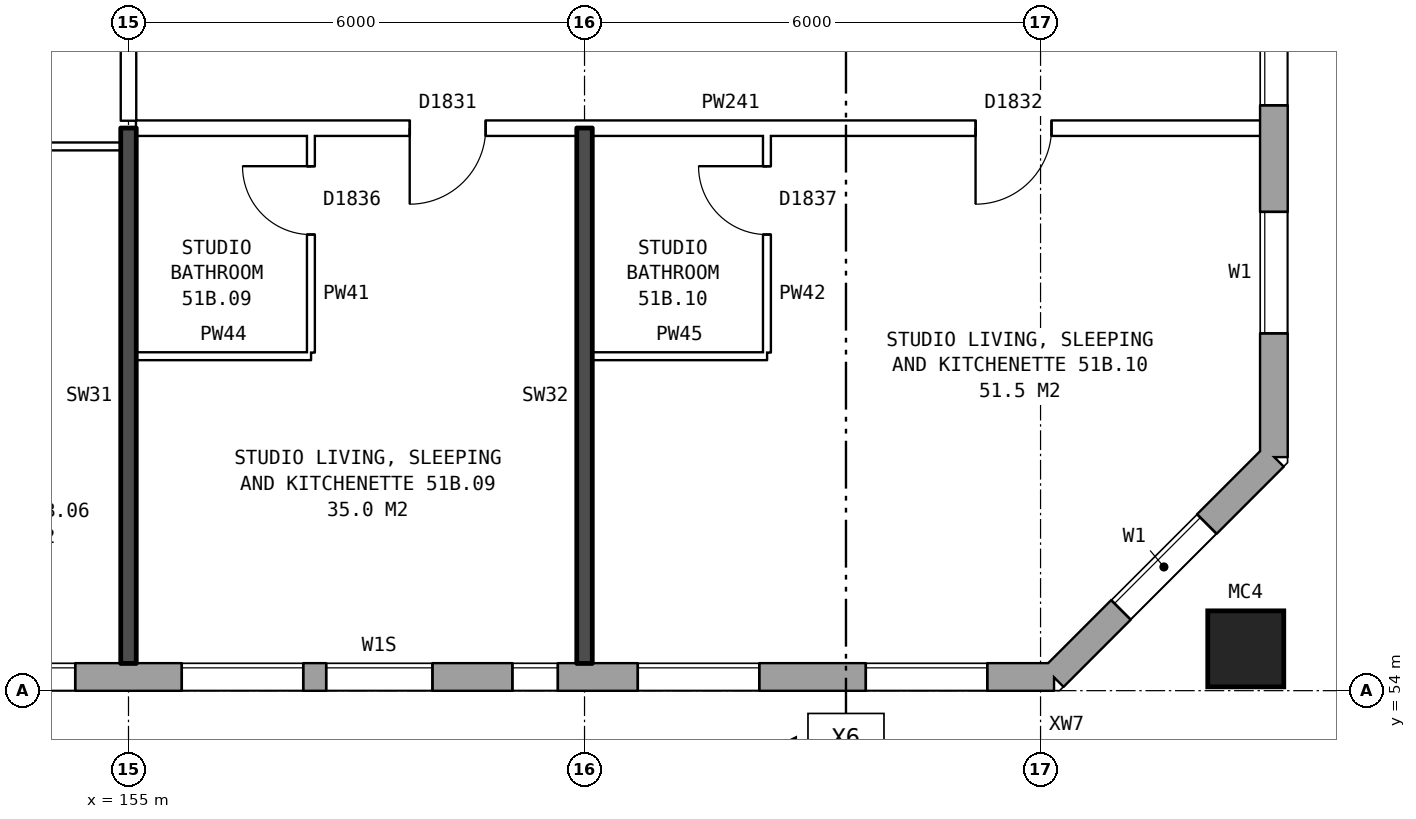
"""IFC4 building model, lengths in metres.
Left out: names, types, materials, properties, quantities, classifications, styles, units other than length and angle.
Written with IfcOpenShell. Run it as: python <this file> out.ifc"""

import sys

from ifc_helpers import new_model, si_unit, direction, frame, frame_2d, origin, origin_2d, place, context, subcontext, project, spatial, rectangle, hollow_rectangle, extrude, element, fill, save


model = new_model("IFC4")
c1 = context("Model", 3, precision=1e-05, world=origin(), true_north=direction((0.0, 1.0)))
c2 = subcontext(c1, "Body", "Model", "MODEL_VIEW")
j1 = project(units=[si_unit("LENGTHUNIT", "METRE"), si_unit("PLANEANGLEUNIT", "RADIAN")], contexts=[c1])
p1 = place(None, origin())
s1 = spatial("IfcSite", under=j1, at=p1, CompositionType="ELEMENT")
p2 = place(p1, origin())
s2 = spatial("IfcBuilding", under=s1, at=p2, CompositionType="ELEMENT")
p3 = place(p2, frame((0.0, 0.0, 182.0)))
s3 = spatial("IfcBuildingStorey", under=s2, at=p3, CompositionType="ELEMENT", Elevation=182.0)
p4 = place(p3, frame((169.7, 54.55, 0.0), z_axis=(0.0, 0.0, 1.0), x_axis=(1.0, 0.0, 0.0)))
e1 = element("IfcColumn", 1, at=p4, inside=s3, PredefinedType="COLUMN", context=c2, shape_type="SweptSolid", body=[
    extrude(hollow_rectangle(XDim=1.0, YDim=1.0, WallThickness=0.055, at=origin_2d()), origin(), (0.0, 0.0, 1.0), 3.1),
])
p5 = place(p3, frame((134.075, 54.18, 0.0), z_axis=(0.0, 0.0, 1.0), x_axis=(1.0, 0.0, 0.0)))
e2 = element("IfcWall", 2, at=p5, inside=s3, PredefinedType="STANDARD", context=c2, shape_type="SweptSolid", body=[
    extrude(rectangle(XDim=33.101, YDim=0.36, at=frame_2d((16.55, 0.0))), origin(), (0.0, 0.0, 1.0), 2.85),
])
p6 = place(p5, frame((0.625, 0.0, 0.8)))
e3 = element("IfcOpeningElement", 3, at=p6, cuts=e2, PredefinedType="OPENING", context=c2, shape_type="SweptSolid", body=[
    extrude(rectangle(XDim=1.6, YDim=1.8, at=frame_2d((0.8, 0.9))), frame((0.0, 0.19, 0.0), z_axis=(0.0, -1.0, 0.0), x_axis=(1.0, 0.0, 0.0)), (0.0, 0.0, 1.0), 0.38),
])
p7 = place(p5, frame((3.625, 0.0, 0.8)))
e4 = element("IfcOpeningElement", 4, at=p7, cuts=e2, PredefinedType="OPENING", context=c2, shape_type="SweptSolid", body=[
    extrude(rectangle(XDim=1.6, YDim=1.8, at=frame_2d((0.8, 0.9))), frame((0.0, 0.19, 0.0), z_axis=(0.0, -1.0, 0.0), x_axis=(1.0, 0.0, 0.0)), (0.0, 0.0, 1.0), 0.38),
])
p8 = place(p5, frame((5.525, 0.0, 0.8)))
e5 = element("IfcOpeningElement", 5, at=p8, cuts=e2, PredefinedType="OPENING", context=c2, shape_type="SweptSolid", body=[
    extrude(rectangle(XDim=0.6, YDim=1.8, at=frame_2d((0.3, 0.9))), frame((0.0, 0.19, 0.0), z_axis=(0.0, -1.0, 0.0), x_axis=(1.0, 0.0, 0.0)), (0.0, 0.0, 1.0), 0.38),
])
p9 = place(p5, frame((9.625, 0.0, 0.8)))
e6 = element("IfcOpeningElement", 6, at=p9, cuts=e2, PredefinedType="OPENING", context=c2, shape_type="SweptSolid", body=[
    extrude(rectangle(XDim=1.6, YDim=1.8, at=frame_2d((0.8, 0.9))), frame((0.0, 0.19, 0.0), z_axis=(0.0, -1.0, 0.0), x_axis=(1.0, 0.0, 0.0)), (0.0, 0.0, 1.0), 0.38),
])
p10 = place(p5, frame((12.625, 0.0, 0.8)))
e7 = element("IfcOpeningElement", 7, at=p10, cuts=e2, PredefinedType="OPENING", context=c2, shape_type="SweptSolid", body=[
    extrude(rectangle(XDim=1.6, YDim=1.8, at=frame_2d((0.8, 0.9))), frame((0.0, 0.19, 0.0), z_axis=(0.0, -1.0, 0.0), x_axis=(1.0, 0.0, 0.0)), (0.0, 0.0, 1.0), 0.38),
])
p11 = place(p5, frame((15.625, 0.0, 0.8)))
e8 = element("IfcOpeningElement", 8, at=p11, cuts=e2, PredefinedType="OPENING", context=c2, shape_type="SweptSolid", body=[
    extrude(rectangle(XDim=1.6, YDim=1.8, at=frame_2d((0.8, 0.9))), frame((0.0, 0.19, 0.0), z_axis=(0.0, -1.0, 0.0), x_axis=(1.0, 0.0, 0.0)), (0.0, 0.0, 1.0), 0.38),
])
p12 = place(p5, frame((18.625, 0.0, 0.8)))
e9 = element("IfcOpeningElement", 9, at=p12, cuts=e2, PredefinedType="OPENING", context=c2, shape_type="SweptSolid", body=[
    extrude(rectangle(XDim=1.6, YDim=1.8, at=frame_2d((0.8, 0.9))), frame((0.0, 0.19, 0.0), z_axis=(0.0, -1.0, 0.0), x_axis=(1.0, 0.0, 0.0)), (0.0, 0.0, 1.0), 0.38),
])
p13 = place(p5, frame((21.625, 0.0, 0.8)))
e10 = element("IfcOpeningElement", 10, at=p13, cuts=e2, PredefinedType="OPENING", context=c2, shape_type="SweptSolid", body=[
    extrude(rectangle(XDim=1.6, YDim=1.8, at=frame_2d((0.8, 0.9))), frame((0.0, 0.19, 0.0), z_axis=(0.0, -1.0, 0.0), x_axis=(1.0, 0.0, 0.0)), (0.0, 0.0, 1.0), 0.38),
])
p14 = place(p5, frame((23.525, 0.0, 0.8)))
e11 = element("IfcOpeningElement", 11, at=p14, cuts=e2, PredefinedType="OPENING", context=c2, shape_type="SweptSolid", body=[
    extrude(rectangle(XDim=1.4, YDim=0.9, at=frame_2d((0.7, 0.45))), frame((0.0, 0.19, 0.0), z_axis=(0.0, -1.0, 0.0), x_axis=(1.0, 0.0, 0.0)), (0.0, 0.0, 1.0), 0.38),
])
p15 = place(p5, frame((27.625, 0.0, 0.8)))
e12 = element("IfcOpeningElement", 12, at=p15, cuts=e2, PredefinedType="OPENING", context=c2, shape_type="SweptSolid", body=[
    extrude(rectangle(XDim=1.6, YDim=1.8, at=frame_2d((0.8, 0.9))), frame((0.0, 0.19, 0.0), z_axis=(0.0, -1.0, 0.0), x_axis=(1.0, 0.0, 0.0)), (0.0, 0.0, 1.0), 0.38),
])
p16 = place(p5, frame((30.625, 0.0, 0.8)))
e13 = element("IfcOpeningElement", 13, at=p16, cuts=e2, PredefinedType="OPENING", context=c2, shape_type="SweptSolid", body=[
    extrude(rectangle(XDim=1.6, YDim=1.8, at=frame_2d((0.8, 0.9))), frame((0.0, 0.19, 0.0), z_axis=(0.0, -1.0, 0.0), x_axis=(1.0, 0.0, 0.0)), (0.0, 0.0, 1.0), 0.38),
])
p17 = place(p5, frame((6.425, 0.0, 1.6)))
e14 = element("IfcOpeningElement", 14, at=p17, cuts=e2, PredefinedType="OPENING", context=c2, shape_type="SweptSolid", body=[
    extrude(rectangle(XDim=0.6, YDim=0.9, at=frame_2d((0.3, 0.45))), frame((0.0, 0.19, 0.0), z_axis=(0.0, -1.0, 0.0), x_axis=(1.0, 0.0, 0.0)), (0.0, 0.0, 1.0), 0.38),
])
p18 = place(p5, frame((25.975, 0.0, 1.7)))
e15 = element("IfcOpeningElement", 15, at=p18, cuts=e2, PredefinedType="OPENING", context=c2, shape_type="SweptSolid", body=[
    extrude(rectangle(XDim=0.6, YDim=0.9, at=frame_2d((0.3, 0.45))), frame((0.0, 0.19, 0.0), z_axis=(0.0, -1.0, 0.0), x_axis=(1.0, 0.0, 0.0)), (0.0, 0.0, 1.0), 0.38),
])
p19 = place(p3, frame((167.175, 54.18, 0.0), z_axis=(0.0, 0.0, 1.0), x_axis=(0.707106781187, 0.707106781187, 0.0)))
e16 = element("IfcWall", 16, at=p19, inside=s3, PredefinedType="STANDARD", context=c2, shape_type="SweptSolid", body=[
    extrude(rectangle(XDim=4.094, YDim=0.36, at=frame_2d((2.047, 0.0))), origin(), (0.0, 0.0, 1.0), 2.85),
])
p20 = place(p19, frame((1.247, 0.0, 0.8)))
e17 = element("IfcOpeningElement", 17, at=p20, cuts=e16, PredefinedType="OPENING", context=c2, shape_type="SweptSolid", body=[
    extrude(rectangle(XDim=1.6, YDim=1.8, at=frame_2d((0.8, 0.9))), frame((0.0, 0.19, 0.0), z_axis=(0.0, -1.0, 0.0), x_axis=(1.0, 0.0, 0.0)), (0.0, 0.0, 1.0), 0.38),
])
p21 = place(p3, frame((170.07, 57.075, 0.0), z_axis=(0.0, 0.0, 1.0), x_axis=(0.0, 1.0, 0.0)))
e18 = element("IfcWall", 18, at=p21, inside=s3, PredefinedType="STANDARD", context=c2, shape_type="SweptSolid", body=[
    extrude(rectangle(XDim=25.851, YDim=0.36, at=frame_2d((12.925, 0.0))), origin(), (0.0, 0.0, 1.0), 2.85),
])
p22 = place(p21, frame((1.625, 0.0, 0.8)))
e19 = element("IfcOpeningElement", 19, at=p22, cuts=e18, PredefinedType="OPENING", context=c2, shape_type="SweptSolid", body=[
    extrude(rectangle(XDim=1.6, YDim=1.8, at=frame_2d((0.8, 0.9))), frame((0.0, 0.19, 0.0), z_axis=(0.0, -1.0, 0.0), x_axis=(1.0, 0.0, 0.0)), (0.0, 0.0, 1.0), 0.38),
])
p23 = place(p21, frame((4.625, 0.0, 0.8)))
e20 = element("IfcOpeningElement", 20, at=p23, cuts=e18, PredefinedType="OPENING", context=c2, shape_type="SweptSolid", body=[
    extrude(rectangle(XDim=1.6, YDim=1.8, at=frame_2d((0.8, 0.9))), frame((0.0, 0.19, 0.0), z_axis=(0.0, -1.0, 0.0), x_axis=(1.0, 0.0, 0.0)), (0.0, 0.0, 1.0), 0.38),
])
p24 = place(p21, frame((7.625, 0.0, 0.8)))
e21 = element("IfcOpeningElement", 21, at=p24, cuts=e18, PredefinedType="OPENING", context=c2, shape_type="SweptSolid", body=[
    extrude(rectangle(XDim=1.6, YDim=1.8, at=frame_2d((0.8, 0.9))), frame((0.0, 0.19, 0.0), z_axis=(0.0, -1.0, 0.0), x_axis=(1.0, 0.0, 0.0)), (0.0, 0.0, 1.0), 0.38),
])
p25 = place(p21, frame((6.525, 0.0, 0.8)))
e22 = element("IfcOpeningElement", 22, at=p25, cuts=e18, PredefinedType="OPENING", context=c2, shape_type="SweptSolid", body=[
    extrude(rectangle(XDim=0.8, YDim=1.8, at=frame_2d((0.4, 0.9))), frame((0.0, 0.19, 0.0), z_axis=(0.0, -1.0, 0.0), x_axis=(1.0, 0.0, 0.0)), (0.0, 0.0, 1.0), 0.38),
])
p26 = place(p21, frame((9.525, 0.0, 0.8)))
e23 = element("IfcOpeningElement", 23, at=p26, cuts=e18, PredefinedType="OPENING", context=c2, shape_type="SweptSolid", body=[
    extrude(rectangle(XDim=1.4, YDim=1.2, at=frame_2d((0.7, 0.6))), frame((0.0, 0.19, 0.0), z_axis=(0.0, -1.0, 0.0), x_axis=(1.0, 0.0, 0.0)), (0.0, 0.0, 1.0), 0.38),
])
p27 = place(p21, frame((16.625, 0.0, 0.8)))
e24 = element("IfcOpeningElement", 24, at=p27, cuts=e18, PredefinedType="OPENING", context=c2, shape_type="SweptSolid", body=[
    extrude(rectangle(XDim=1.6, YDim=1.8, at=frame_2d((0.8, 0.9))), frame((0.0, 0.19, 0.0), z_axis=(0.0, -1.0, 0.0), x_axis=(1.0, 0.0, 0.0)), (0.0, 0.0, 1.0), 0.38),
])
p28 = place(p21, frame((19.625, 0.0, 0.8)))
e25 = element("IfcOpeningElement", 25, at=p28, cuts=e18, PredefinedType="OPENING", context=c2, shape_type="SweptSolid", body=[
    extrude(rectangle(XDim=1.6, YDim=1.8, at=frame_2d((0.8, 0.9))), frame((0.0, 0.19, 0.0), z_axis=(0.0, -1.0, 0.0), x_axis=(1.0, 0.0, 0.0)), (0.0, 0.0, 1.0), 0.38),
])
p29 = place(p21, frame((22.625, 0.0, 0.8)))
e26 = element("IfcOpeningElement", 26, at=p29, cuts=e18, PredefinedType="OPENING", context=c2, shape_type="SweptSolid", body=[
    extrude(rectangle(XDim=1.6, YDim=1.8, at=frame_2d((0.8, 0.9))), frame((0.0, 0.19, 0.0), z_axis=(0.0, -1.0, 0.0), x_axis=(1.0, 0.0, 0.0)), (0.0, 0.0, 1.0), 0.38),
])
p30 = place(p21, frame((12.275, 0.0, 0.8)))
e27 = element("IfcOpeningElement", 27, at=p30, cuts=e18, PredefinedType="OPENING", context=c2, shape_type="SweptSolid", body=[
    extrude(rectangle(XDim=1.2, YDim=1.8, at=frame_2d((0.6, 0.9))), frame((0.0, 0.19, 0.0), z_axis=(0.0, -1.0, 0.0), x_axis=(1.0, 0.0, 0.0)), (0.0, 0.0, 1.0), 0.38),
])
p31 = place(p21, frame((14.425, 0.0, 0.8)))
e28 = element("IfcOpeningElement", 28, at=p31, cuts=e18, PredefinedType="OPENING", context=c2, shape_type="SweptSolid", body=[
    extrude(rectangle(XDim=1.2, YDim=0.9, at=frame_2d((0.6, 0.45))), frame((0.0, 0.19, 0.0), z_axis=(0.0, -1.0, 0.0), x_axis=(1.0, 0.0, 0.0)), (0.0, 0.0, 1.0), 0.38),
])
p32 = place(p21, frame((18.525, 0.0, 0.8)))
e29 = element("IfcOpeningElement", 29, at=p32, cuts=e18, PredefinedType="OPENING", context=c2, shape_type="SweptSolid", body=[
    extrude(rectangle(XDim=0.6, YDim=1.8, at=frame_2d((0.3, 0.9))), frame((0.0, 0.19, 0.0), z_axis=(0.0, -1.0, 0.0), x_axis=(1.0, 0.0, 0.0)), (0.0, 0.0, 1.0), 0.38),
])
for number, where, z_axis, x_axis in (
    (30, (155.1, 58.4, 0.0), (0.0, 0.0, 1.0), (1.0, 0.0, 0.0)),
    (31, (161.1, 58.4, 0.0), (0.0, 0.0, 1.0), (1.0, 0.0, 0.0)),
):
    element("IfcWall", number, at=place(p3, frame(where, z_axis=z_axis, x_axis=x_axis)), inside=s3, PredefinedType="PARTITIONING", context=c2, shape_type="SweptSolid", body=[
        extrude(rectangle(XDim=2.3, YDim=0.1, at=frame_2d((1.15, 0.0))), origin(), (0.0, 0.0, 1.0), 2.85),
    ])
p33 = place(p3, frame((152.0, 61.16, 0.0), z_axis=(0.0, 0.0, 1.0), x_axis=(1.0, 0.0, 0.0)))
e32 = element("IfcWall", 32, at=p33, inside=s3, PredefinedType="PARTITIONING", context=c2, shape_type="SweptSolid", body=[
    extrude(rectangle(XDim=2.9, YDim=0.1, at=frame_2d((1.45, 0.0))), origin(), (0.0, 0.0, 1.0), 2.85),
])
p34 = place(p33, frame((1.0, 0.0, 0.0)))
e33 = element("IfcOpeningElement", 33, at=p34, cuts=e32, PredefinedType="OPENING", context=c2, shape_type="SweptSolid", body=[
    extrude(rectangle(XDim=0.9, YDim=2.1, at=frame_2d((0.45, 1.05))), frame((0.0, 0.06, 0.0), z_axis=(0.0, -1.0, 0.0), x_axis=(1.0, 0.0, 0.0)), (0.0, 0.0, 1.0), 0.12),
])
p35 = place(p3, frame((155.1, 61.4, 0.0), z_axis=(0.0, 0.0, 1.0), x_axis=(1.0, 0.0, 0.0)))
e34 = element("IfcWall", 34, at=p35, inside=s3, PredefinedType="PARTITIONING", context=c2, shape_type="SweptSolid", body=[
    extrude(rectangle(XDim=14.79, YDim=0.2, at=frame_2d((7.395, 0.0))), origin(), (0.0, 0.0, 1.0), 2.85),
])
p36 = place(p35, frame((3.6, 0.0, 0.0)))
e35 = element("IfcOpeningElement", 35, at=p36, cuts=e34, PredefinedType="OPENING", context=c2, shape_type="SweptSolid", body=[
    extrude(rectangle(XDim=1.0, YDim=2.1, at=frame_2d((0.5, 1.05))), frame((0.0, 0.11, 0.0), z_axis=(0.0, -1.0, 0.0), x_axis=(1.0, 0.0, 0.0)), (0.0, 0.0, 1.0), 0.22),
])
p37 = place(p35, frame((11.045, 0.0, 0.0)))
e36 = element("IfcOpeningElement", 36, at=p37, cuts=e34, PredefinedType="OPENING", context=c2, shape_type="SweptSolid", body=[
    extrude(rectangle(XDim=1.0, YDim=2.1, at=frame_2d((0.5, 1.05))), frame((0.0, 0.11, 0.0), z_axis=(0.0, -1.0, 0.0), x_axis=(1.0, 0.0, 0.0)), (0.0, 0.0, 1.0), 0.22),
])
p38 = place(p3, frame((155.0, 54.36, 0.0), z_axis=(0.0, 0.0, 1.0), x_axis=(0.0, 1.0, 0.0)))
e37 = element("IfcWall", 37, at=p38, inside=s3, PredefinedType="SOLIDWALL", context=c2, shape_type="SweptSolid", body=[
    extrude(rectangle(XDim=7.04, YDim=0.2, at=frame_2d((3.52, 0.0))), origin(), (0.0, 0.0, 1.0), 2.85),
])
p39 = place(p3, frame((155.0, 61.5, 0.0), z_axis=(0.0, 0.0, 1.0), x_axis=(0.0, 1.0, 0.0)))
e38 = element("IfcWall", 38, at=p39, inside=s3, PredefinedType="PARTITIONING", context=c2, shape_type="SweptSolid", body=[
    extrude(rectangle(XDim=2.2, YDim=0.2, at=frame_2d((1.1, 0.0))), origin(), (0.0, 0.0, 1.0), 2.85),
])
p40 = place(p3, frame((157.4, 58.45, 0.0), z_axis=(0.0, 0.0, 1.0), x_axis=(0.0, 1.0, 0.0)))
e39 = element("IfcWall", 39, at=p40, inside=s3, PredefinedType="PARTITIONING", context=c2, shape_type="SweptSolid", body=[
    extrude(rectangle(XDim=2.85, YDim=0.1, at=frame_2d((1.425, 0.0))), origin(), (0.0, 0.0, 1.0), 2.85),
])
p41 = place(p40, frame((1.55, 0.0, 0.0)))
e40 = element("IfcOpeningElement", 40, at=p41, cuts=e39, PredefinedType="OPENING", context=c2, shape_type="SweptSolid", body=[
    extrude(rectangle(XDim=0.9, YDim=2.1, at=frame_2d((0.45, 1.05))), frame((0.0, 0.06, 0.0), z_axis=(0.0, -1.0, 0.0), x_axis=(1.0, 0.0, 0.0)), (0.0, 0.0, 1.0), 0.12),
])
p42 = place(p3, frame((161.0, 54.36, 0.0), z_axis=(0.0, 0.0, 1.0), x_axis=(0.0, 1.0, 0.0)))
e41 = element("IfcWall", 41, at=p42, inside=s3, PredefinedType="SOLIDWALL", context=c2, shape_type="SweptSolid", body=[
    extrude(rectangle(XDim=7.04, YDim=0.2, at=frame_2d((3.52, 0.0))), origin(), (0.0, 0.0, 1.0), 2.85),
])
p43 = place(p3, frame((163.4, 58.45, 0.0), z_axis=(0.0, 0.0, 1.0), x_axis=(0.0, 1.0, 0.0)))
e42 = element("IfcWall", 42, at=p43, inside=s3, PredefinedType="PARTITIONING", context=c2, shape_type="SweptSolid", body=[
    extrude(rectangle(XDim=2.85, YDim=0.1, at=frame_2d((1.425, 0.0))), origin(), (0.0, 0.0, 1.0), 2.85),
])
p44 = place(p43, frame((1.55, 0.0, 0.0)))
e43 = element("IfcOpeningElement", 43, at=p44, cuts=e42, PredefinedType="OPENING", context=c2, shape_type="SweptSolid", body=[
    extrude(rectangle(XDim=0.9, YDim=2.1, at=frame_2d((0.45, 1.05))), frame((0.0, 0.06, 0.0), z_axis=(0.0, -1.0, 0.0), x_axis=(1.0, 0.0, 0.0)), (0.0, 0.0, 1.0), 0.12),
])
p45 = place(p12, origin())
e44 = element("IfcWindow", 44, at=p45, inside=s3, PartitioningType="SINGLE_PANEL", PredefinedType="WINDOW", context=c2, shape_type="SweptSolid", body=[
    extrude(rectangle(XDim=1.6, YDim=1.8, at=frame_2d((0.8, 0.9))), frame((0.0, 0.15, 0.0), z_axis=(0.0, -1.0, 0.0), x_axis=(1.0, 0.0, 0.0)), (0.0, 0.0, 1.0), 0.06),
])
fill(e9, e44)
p46 = place(p13, origin())
e45 = element("IfcWindow", 45, at=p46, inside=s3, PartitioningType="SINGLE_PANEL", PredefinedType="WINDOW", context=c2, shape_type="SweptSolid", body=[
    extrude(rectangle(XDim=1.6, YDim=1.8, at=frame_2d((0.8, 0.9))), frame((0.0, 0.15, 0.0), z_axis=(0.0, -1.0, 0.0), x_axis=(1.0, 0.0, 0.0)), (0.0, 0.0, 1.0), 0.06),
])
fill(e10, e45)
p47 = place(p14, origin())
e46 = element("IfcWindow", 46, at=p47, inside=s3, PartitioningType="SINGLE_PANEL", PredefinedType="WINDOW", context=c2, shape_type="SweptSolid", body=[
    extrude(rectangle(XDim=1.4, YDim=0.9, at=frame_2d((0.7, 0.45))), frame((0.0, 0.15, 0.0), z_axis=(0.0, -1.0, 0.0), x_axis=(1.0, 0.0, 0.0)), (0.0, 0.0, 1.0), 0.06),
])
fill(e11, e46)
p48 = place(p15, origin())
e47 = element("IfcWindow", 47, at=p48, inside=s3, PartitioningType="SINGLE_PANEL", PredefinedType="WINDOW", context=c2, shape_type="SweptSolid", body=[
    extrude(rectangle(XDim=1.6, YDim=1.8, at=frame_2d((0.8, 0.9))), frame((0.0, 0.15, 0.0), z_axis=(0.0, -1.0, 0.0), x_axis=(1.0, 0.0, 0.0)), (0.0, 0.0, 1.0), 0.06),
])
fill(e12, e47)
p49 = place(p16, origin())
e48 = element("IfcWindow", 48, at=p49, inside=s3, PartitioningType="SINGLE_PANEL", PredefinedType="WINDOW", context=c2, shape_type="SweptSolid", body=[
    extrude(rectangle(XDim=1.6, YDim=1.8, at=frame_2d((0.8, 0.9))), frame((0.0, 0.15, 0.0), z_axis=(0.0, -1.0, 0.0), x_axis=(1.0, 0.0, 0.0)), (0.0, 0.0, 1.0), 0.06),
])
fill(e13, e48)
p50 = place(p20, origin())
e49 = element("IfcWindow", 49, at=p50, inside=s3, PartitioningType="SINGLE_PANEL", PredefinedType="WINDOW", context=c2, shape_type="SweptSolid", body=[
    extrude(rectangle(XDim=1.6, YDim=1.8, at=frame_2d((0.8, 0.9))), frame((0.0, 0.15, 0.0), z_axis=(0.0, -1.0, 0.0), x_axis=(1.0, 0.0, 0.0)), (0.0, 0.0, 1.0), 0.06),
])
fill(e17, e49)
p51 = place(p22, origin())
e50 = element("IfcWindow", 50, at=p51, inside=s3, PartitioningType="SINGLE_PANEL", PredefinedType="WINDOW", context=c2, shape_type="SweptSolid", body=[
    extrude(rectangle(XDim=1.6, YDim=1.8, at=frame_2d((0.8, 0.9))), frame((0.0, 0.15, 0.0), z_axis=(0.0, -1.0, 0.0), x_axis=(1.0, 0.0, 0.0)), (0.0, 0.0, 1.0), 0.06),
])
fill(e19, e50)
p52 = place(p23, origin())
e51 = element("IfcWindow", 51, at=p52, inside=s3, PartitioningType="SINGLE_PANEL", PredefinedType="WINDOW", context=c2, shape_type="SweptSolid", body=[
    extrude(rectangle(XDim=1.6, YDim=1.8, at=frame_2d((0.8, 0.9))), frame((0.0, 0.15, 0.0), z_axis=(0.0, -1.0, 0.0), x_axis=(1.0, 0.0, 0.0)), (0.0, 0.0, 1.0), 0.06),
])
fill(e20, e51)
p53 = place(p36, frame((1.0, 0.0, 0.0), z_axis=(0.0, 0.0, 1.0), x_axis=(-1.0, 0.0, 0.0)))
e52 = element("IfcDoor", 52, at=p53, inside=s3, OperationType="SINGLE_SWING_RIGHT", PredefinedType="DOOR", context=c2, shape_type="SweptSolid", body=[
    extrude(rectangle(XDim=1.0, YDim=2.1, at=frame_2d((0.5, 1.05))), frame((0.0, 0.025, 0.0), z_axis=(0.0, -1.0, 0.0), x_axis=(1.0, 0.0, 0.0)), (0.0, 0.0, 1.0), 0.05),
])
fill(e35, e52)
p54 = place(p41, origin())
e53 = element("IfcDoor", 53, at=p54, inside=s3, OperationType="SINGLE_SWING_RIGHT", PredefinedType="DOOR", context=c2, shape_type="SweptSolid", body=[
    extrude(rectangle(XDim=0.9, YDim=2.1, at=frame_2d((0.45, 1.05))), frame((0.0, 0.025, 0.0), z_axis=(0.0, -1.0, 0.0), x_axis=(1.0, 0.0, 0.0)), (0.0, 0.0, 1.0), 0.05),
])
fill(e40, e53)
p55 = place(p37, frame((1.0, 0.0, 0.0), z_axis=(0.0, 0.0, 1.0), x_axis=(-1.0, 0.0, 0.0)))
e54 = element("IfcDoor", 54, at=p55, inside=s3, OperationType="SINGLE_SWING_RIGHT", PredefinedType="DOOR", context=c2, shape_type="SweptSolid", body=[
    extrude(rectangle(XDim=1.0, YDim=2.1, at=frame_2d((0.5, 1.05))), frame((0.0, 0.025, 0.0), z_axis=(0.0, -1.0, 0.0), x_axis=(1.0, 0.0, 0.0)), (0.0, 0.0, 1.0), 0.05),
])
fill(e36, e54)
p56 = place(p44, origin())
e55 = element("IfcDoor", 55, at=p56, inside=s3, OperationType="SINGLE_SWING_RIGHT", PredefinedType="DOOR", context=c2, shape_type="SweptSolid", body=[
    extrude(rectangle(XDim=0.9, YDim=2.1, at=frame_2d((0.45, 1.05))), frame((0.0, 0.025, 0.0), z_axis=(0.0, -1.0, 0.0), x_axis=(1.0, 0.0, 0.0)), (0.0, 0.0, 1.0), 0.05),
])
fill(e43, e55)
p57 = place(p18, origin())
e56 = element("IfcWindow", 56, at=p57, inside=s3, PartitioningType="SINGLE_PANEL", PredefinedType="WINDOW", context=c2, shape_type="SweptSolid", body=[
    extrude(rectangle(XDim=0.6, YDim=0.9, at=frame_2d((0.3, 0.45))), frame((0.0, 0.15, 0.0), z_axis=(0.0, -1.0, 0.0), x_axis=(1.0, 0.0, 0.0)), (0.0, 0.0, 1.0), 0.06),
])
fill(e15, e56)
save(model, sys.argv[1])
